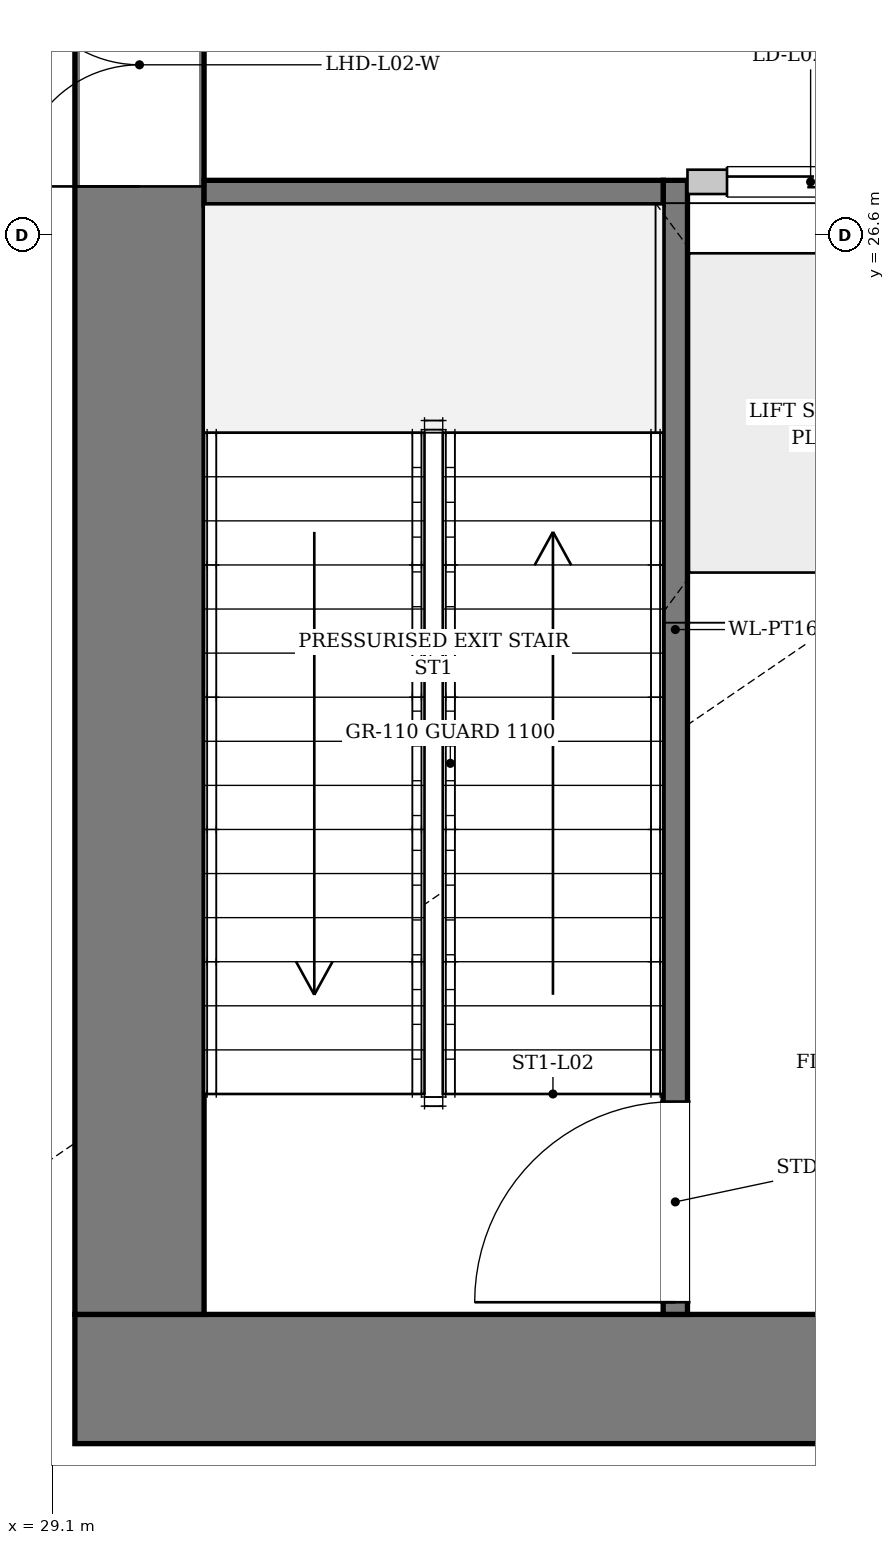
"""IFC4 building model, lengths in metres.
Left out: names, types, materials, properties, quantities, classifications, styles, units other than length and angle.
Written with IfcOpenShell. Run it as: python <this file> out.ifc"""

import sys

from ifc_helpers import new_model, si_unit, direction, frame, frame_2d, origin, place, context, subcontext, project, spatial, rectangle, extrude, source, transform, mapped, element, fill, save


model = new_model("IFC4")
c1 = context("Model", 3, precision=1e-05, world=origin(), true_north=direction((0.0, 1.0)))
c2 = subcontext(c1, "Body", "Model", "MODEL_VIEW")
j1 = project(units=[si_unit("LENGTHUNIT", "METRE"), si_unit("PLANEANGLEUNIT", "RADIAN")], contexts=[c1])
p1 = place(None, origin())
s1 = spatial("IfcSite", under=j1, at=p1, CompositionType="ELEMENT")
p2 = place(p1, origin())
s2 = spatial("IfcBuilding", under=s1, at=p2, CompositionType="ELEMENT")
p3 = place(p2, frame((0.0, 0.0, 10.2)))
s3 = spatial("IfcBuildingStorey", under=s2, at=p3, CompositionType="ELEMENT", Elevation=10.2)
p4 = place(p3, frame((46.75, 19.075, 0.0), z_axis=(0.0, 0.0, 1.0), x_axis=(-1.0, 0.0, 0.0)))
e1 = element("IfcWall", 1, at=p4, inside=s3, PredefinedType="SHEAR", context=c2, shape_type="SweptSolid", body=[
    extrude(rectangle(XDim=17.5, YDim=0.85, at=frame_2d((8.75, 0.0))), origin(), (0.0, 0.0, 1.0), 5.08),
])
p5 = place(p4, frame((4.95, 0.0, 0.0)))
e2 = element("IfcOpeningElement", 2, at=p5, cuts=e1, PredefinedType="OPENING", context=c2, shape_type="SweptSolid", body=[
    extrude(rectangle(XDim=1.12, YDim=2.25, at=frame_2d((0.56, 1.125))), frame((0.0, 0.435, 0.0), z_axis=(0.0, -1.0, 0.0), x_axis=(1.0, 0.0, 0.0)), (0.0, 0.0, 1.0), 0.87),
])
p6 = place(p4, frame((11.45, 0.0, 0.0)))
e3 = element("IfcOpeningElement", 3, at=p6, cuts=e1, PredefinedType="OPENING", context=c2, shape_type="SweptSolid", body=[
    extrude(rectangle(XDim=1.12, YDim=2.25, at=frame_2d((0.56, 1.125))), frame((0.0, 0.435, 0.0), z_axis=(0.0, -1.0, 0.0), x_axis=(1.0, 0.0, 0.0)), (0.0, 0.0, 1.0), 0.87),
])
p7 = place(p3, frame((29.675, 19.5, 0.0), z_axis=(0.0, 0.0, 1.0), x_axis=(0.0, 1.0, 0.0)))
e4 = element("IfcWall", 4, at=p7, inside=s3, PredefinedType="SHEAR", context=c2, shape_type="SweptSolid", body=[
    extrude(rectangle(XDim=14.2, YDim=0.85, at=frame_2d((7.1, 0.0))), origin(), (0.0, 0.0, 1.0), 5.08),
])
p8 = place(p7, frame((7.42, 0.0, 0.0)))
e5 = element("IfcOpeningElement", 5, at=p8, cuts=e4, PredefinedType="OPENING", context=c2, shape_type="SweptSolid", body=[
    extrude(rectangle(XDim=1.6, YDim=2.2, at=frame_2d((0.8, 1.1))), frame((0.0, 0.435, 0.0), z_axis=(0.0, -1.0, 0.0), x_axis=(1.0, 0.0, 0.0)), (0.0, 0.0, 1.0), 0.87),
])
p9 = place(p3, frame((33.2, 19.5, 0.0), z_axis=(0.0, 0.0, 1.0), x_axis=(0.0, 1.0, 0.0)))
e6 = element("IfcWall", 6, at=p9, inside=s3, PredefinedType="PARTITIONING", context=c2, shape_type="SweptSolid", body=[
    extrude(rectangle(XDim=7.46, YDim=0.16, at=frame_2d((3.73, 0.0))), origin(), (0.0, 0.0, 1.0), 5.08),
])
p10 = place(p9, frame((0.08, 0.0, 0.0)))
e7 = element("IfcOpeningElement", 7, at=p10, cuts=e6, PredefinedType="OPENING", context=c2, shape_type="SweptSolid", body=[
    extrude(rectangle(XDim=1.32, YDim=2.2, at=frame_2d((0.66, 1.1))), frame((0.0, 0.09, 0.0), z_axis=(0.0, -1.0, 0.0), x_axis=(1.0, 0.0, 0.0)), (0.0, 0.0, 1.0), 0.18),
])
p11 = place(p3, frame((30.1, 26.88, 0.0), z_axis=(0.0, 0.0, 1.0), x_axis=(1.0, 0.0, 0.0)))
e8 = element("IfcWall", 8, at=p11, inside=s3, PredefinedType="PARTITIONING", context=c2, shape_type="SweptSolid", body=[
    extrude(rectangle(XDim=3.02, YDim=0.16, at=frame_2d((1.51, 0.0))), origin(), (0.0, 0.0, 1.0), 5.08),
])
p12 = place(p3, frame((33.28, 24.49, 0.0), z_axis=(0.0, 0.0, 1.0), x_axis=(1.0, 0.0, 0.0)))
e9 = element("IfcWall", 9, at=p12, inside=s3, PredefinedType="PARTITIONING", context=c2, shape_type="SweptSolid", body=[
    extrude(rectangle(XDim=9.44, YDim=0.16, at=frame_2d((4.72, 0.0))), origin(), (0.0, 0.0, 1.0), 5.08),
])
p13 = place(p3, frame((33.28, 26.95, 0.0), z_axis=(0.0, 0.0, 1.0), x_axis=(1.0, 0.0, 0.0)))
e10 = element("IfcWall", 10, at=p13, inside=s3, PredefinedType="PARTITIONING", context=c2, shape_type="SweptSolid", body=[
    extrude(rectangle(XDim=9.44, YDim=0.16, at=frame_2d((4.72, 0.0))), origin(), (0.0, 0.0, 1.0), 5.08),
])
p14 = place(p13, frame((0.26, 0.0, 0.0)))
e11 = element("IfcOpeningElement", 11, at=p14, cuts=e10, PredefinedType="OPENING", context=c2, shape_type="SweptSolid", body=[
    extrude(rectangle(XDim=1.1, YDim=2.2, at=frame_2d((0.55, 1.1))), frame((0.0, 0.09, 0.0), z_axis=(0.0, -1.0, 0.0), x_axis=(1.0, 0.0, 0.0)), (0.0, 0.0, 1.0), 0.18),
])
p15 = place(p13, frame((2.01, 0.0, 0.0)))
e12 = element("IfcOpeningElement", 12, at=p15, cuts=e10, PredefinedType="OPENING", context=c2, shape_type="SweptSolid", body=[
    extrude(rectangle(XDim=1.1, YDim=2.2, at=frame_2d((0.55, 1.1))), frame((0.0, 0.09, 0.0), z_axis=(0.0, -1.0, 0.0), x_axis=(1.0, 0.0, 0.0)), (0.0, 0.0, 1.0), 0.18),
])
p16 = place(p13, frame((3.76, 0.0, 0.0)))
e13 = element("IfcOpeningElement", 13, at=p16, cuts=e10, PredefinedType="OPENING", context=c2, shape_type="SweptSolid", body=[
    extrude(rectangle(XDim=1.1, YDim=2.2, at=frame_2d((0.55, 1.1))), frame((0.0, 0.09, 0.0), z_axis=(0.0, -1.0, 0.0), x_axis=(1.0, 0.0, 0.0)), (0.0, 0.0, 1.0), 0.18),
])
p17 = place(p13, frame((5.51, 0.0, 0.0)))
e14 = element("IfcOpeningElement", 14, at=p17, cuts=e10, PredefinedType="OPENING", context=c2, shape_type="SweptSolid", body=[
    extrude(rectangle(XDim=1.1, YDim=2.2, at=frame_2d((0.55, 1.1))), frame((0.0, 0.09, 0.0), z_axis=(0.0, -1.0, 0.0), x_axis=(1.0, 0.0, 0.0)), (0.0, 0.0, 1.0), 0.18),
])
m1 = source(origin(), c2, "Body", "SweptSolid", [
    extrude(rectangle(XDim=1.6, YDim=2.2, at=frame_2d((0.8, 1.1))), frame((0.0, 0.025, 0.0), z_axis=(0.0, -1.0, 0.0), x_axis=(1.0, 0.0, 0.0)), (0.0, 0.0, 1.0), 0.05),
])
p18 = place(p8, origin())
e15 = element("IfcDoor", 15, at=p18, inside=s3, OperationType="DOUBLE_DOOR_SINGLE_SWING", PredefinedType="DOOR", context=c2, shape_type="MappedRepresentation", body=[
    mapped(m1, transform((0.0, 0.0, 0.0), x_axis=(1.0, 0.0, 0.0), y_axis=(0.0, 1.0, 0.0), z_axis=(0.0, 0.0, 1.0), scale=1.0)),
])
fill(e5, e15)
m2 = source(origin(), c2, "Body", "SweptSolid", [
    extrude(rectangle(XDim=1.32, YDim=2.2, at=frame_2d((0.66, 1.1))), frame((0.0, 0.025, 0.0), z_axis=(0.0, -1.0, 0.0), x_axis=(1.0, 0.0, 0.0)), (0.0, 0.0, 1.0), 0.05),
])
p19 = place(p10, origin())
e16 = element("IfcDoor", 16, at=p19, inside=s3, OperationType="SINGLE_SWING_LEFT", PredefinedType="DOOR", context=c2, shape_type="MappedRepresentation", body=[
    mapped(m2, transform((0.0, 0.0, 0.0), x_axis=(1.0, 0.0, 0.0), y_axis=(0.0, 1.0, 0.0), z_axis=(0.0, 0.0, 1.0), scale=1.0)),
])
fill(e7, e16)
m3 = source(origin(), c2, "Body", "SweptSolid", [
    extrude(rectangle(XDim=1.1, YDim=2.2, at=frame_2d((0.55, 1.1))), frame((0.0, 0.025, 0.0), z_axis=(0.0, -1.0, 0.0), x_axis=(1.0, 0.0, 0.0)), (0.0, 0.0, 1.0), 0.05),
])
p20 = place(p14, origin())
e17 = element("IfcDoor", 17, at=p20, inside=s3, OperationType="DOUBLE_DOOR_SLIDING", PredefinedType="DOOR", context=c2, shape_type="MappedRepresentation", body=[
    mapped(m3, transform((0.0, 0.0, 0.0), x_axis=(1.0, 0.0, 0.0), y_axis=(0.0, 1.0, 0.0), z_axis=(0.0, 0.0, 1.0), scale=1.0)),
])
fill(e11, e17)
save(model, sys.argv[1])
